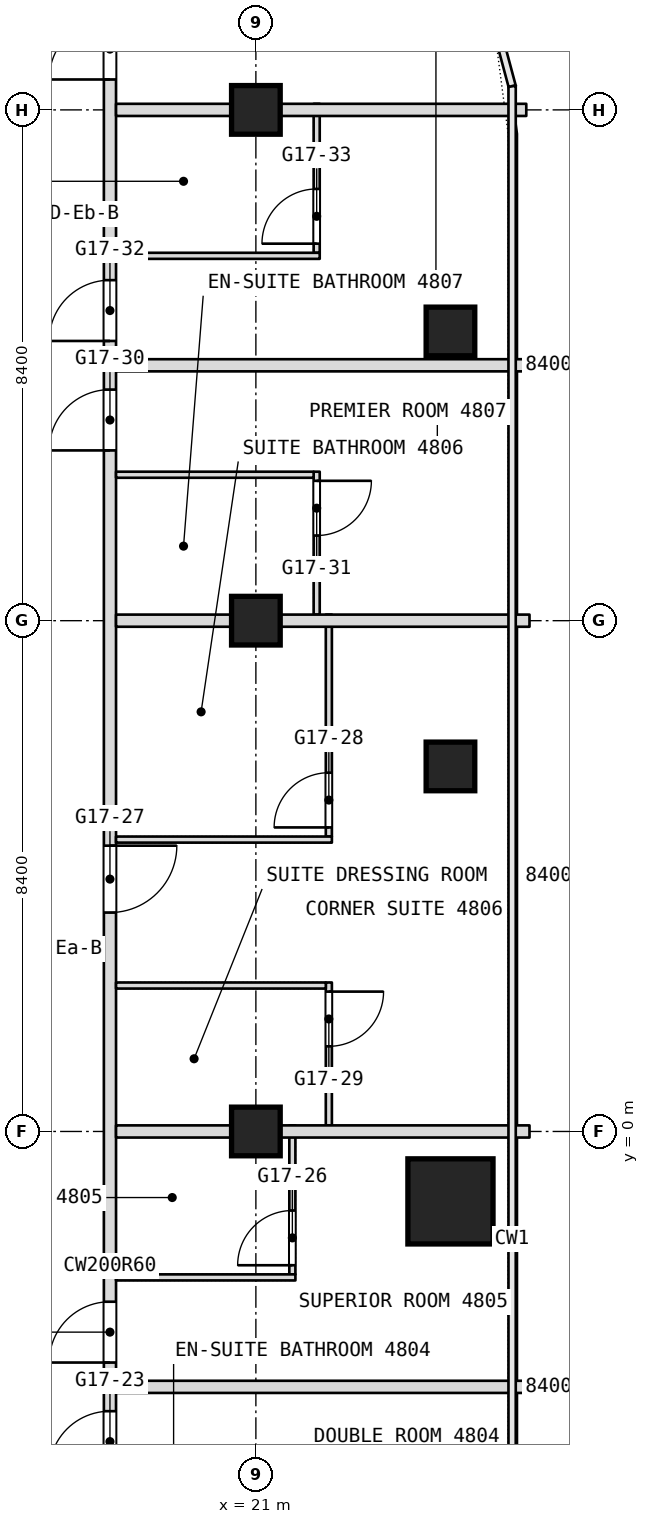
"""IFC4 building model, lengths in metres.
Left out: names, types, materials, properties, quantities, classifications, styles, units other than length and angle.
Written with IfcOpenShell. Run it as: python <this file> out.ifc"""

import sys

from ifc_helpers import new_model, si_unit, direction, frame, frame_2d, origin, origin_2d, place, context, subcontext, project, spatial, rectangle, extrude, element, fill, save


model = new_model("IFC4")
c1 = context("Model", 3, precision=1e-05, world=origin(), true_north=direction((0.0, 1.0)))
c2 = subcontext(c1, "Body", "Model", "MODEL_VIEW")
j1 = project(units=[si_unit("LENGTHUNIT", "METRE"), si_unit("PLANEANGLEUNIT", "RADIAN")], contexts=[c1])
p1 = place(None, origin())
s1 = spatial("IfcSite", under=j1, at=p1, CompositionType="ELEMENT")
p2 = place(p1, origin())
s2 = spatial("IfcBuilding", under=s1, at=p2, CompositionType="ELEMENT")
p3 = place(p2, frame((0.0, 0.0, 209.3)))
s3 = spatial("IfcBuildingStorey", under=s2, at=p3, CompositionType="ELEMENT", Elevation=209.3)
p4 = place(p3, frame((24.2, -1.15, 0.0), z_axis=(0.0, 0.0, 1.0), x_axis=(1.0, 0.0, 0.0)))
e1 = element("IfcColumn", 1, at=p4, inside=s3, PredefinedType="COLUMN", context=c2, shape_type="SweptSolid", body=[
    extrude(rectangle(XDim=1.4, YDim=1.4, at=origin_2d()), origin(), (0.0, 0.0, 1.0), 3.6),
])
for number, where, z_axis, x_axis in (
    (2, (21.0, 0.0, 0.0), (0.0, 0.0, 1.0), (1.0, 0.0, 0.0)),
    (3, (21.0, 8.4, 0.0), (0.0, 0.0, 1.0), (1.0, 0.0, 0.0)),
    (4, (21.0, 16.8, 0.0), (0.0, 0.0, 1.0), (1.0, 0.0, 0.0)),
    (5, (24.2, 13.156, 0.0), (0.0, 0.0, 1.0), (1.0, 0.0, 0.0)),
    (6, (24.2, 6.003, 0.0), (0.0, 0.0, 1.0), (1.0, 0.0, 0.0)),
):
    element("IfcColumn", number, at=place(p3, frame(where, z_axis=z_axis, x_axis=x_axis)), inside=s3, PredefinedType="COLUMN", context=c2, shape_type="SweptSolid", body=[
        extrude(rectangle(XDim=0.8, YDim=0.8, at=origin_2d()), origin(), (0.0, 0.0, 1.0), 3.6),
    ])
p5 = place(p3, frame((22.2, 0.1, 0.0), z_axis=(0.0, 0.0, 1.0), x_axis=(0.0, 1.0, 0.0)))
e7 = element("IfcWall", 7, at=p5, inside=s3, PredefinedType="PARTITIONING", context=c2, shape_type="SweptSolid", body=[
    extrude(rectangle(XDim=2.35, YDim=0.1, at=frame_2d((1.175, 0.0))), origin(), (0.0, 0.0, 1.0), 3.34),
])
p6 = place(p5, frame((1.3, 0.0, 0.0)))
e8 = element("IfcOpeningElement", 8, at=p6, cuts=e7, PredefinedType="OPENING", context=c2, shape_type="SweptSolid", body=[
    extrude(rectangle(XDim=0.9, YDim=2.1, at=frame_2d((0.45, 1.05))), frame((0.0, 0.05, 0.0), z_axis=(0.0, -1.0, 0.0), x_axis=(1.0, 0.0, 0.0)), (0.0, 0.0, 1.0), 0.1),
])
p7 = place(p3, frame((22.2, 4.85, 0.0), z_axis=(0.0, 0.0, 1.0), x_axis=(0.0, 1.0, 0.0)))
e9 = element("IfcWall", 9, at=p7, inside=s3, PredefinedType="PARTITIONING", context=c2, shape_type="SweptSolid", body=[
    extrude(rectangle(XDim=3.65, YDim=0.1, at=frame_2d((1.825, 0.0))), origin(), (0.0, 0.0, 1.0), 3.34),
])
p8 = place(p7, frame((0.15, 0.0, 0.0)))
e10 = element("IfcOpeningElement", 10, at=p8, cuts=e9, PredefinedType="OPENING", context=c2, shape_type="SweptSolid", body=[
    extrude(rectangle(XDim=0.9, YDim=2.1, at=frame_2d((0.45, 1.05))), frame((0.0, 0.05, 0.0), z_axis=(0.0, -1.0, 0.0), x_axis=(1.0, 0.0, 0.0)), (0.0, 0.0, 1.0), 0.1),
])
p9 = place(p3, frame((22.0, 8.5, 0.0), z_axis=(0.0, 0.0, 1.0), x_axis=(0.0, 1.0, 0.0)))
e11 = element("IfcWall", 11, at=p9, inside=s3, PredefinedType="PARTITIONING", context=c2, shape_type="SweptSolid", body=[
    extrude(rectangle(XDim=2.35, YDim=0.1, at=frame_2d((1.175, 0.0))), origin(), (0.0, 0.0, 1.0), 3.34),
])
p10 = place(p9, frame((1.3, 0.0, 0.0)))
e12 = element("IfcOpeningElement", 12, at=p10, cuts=e11, PredefinedType="OPENING", context=c2, shape_type="SweptSolid", body=[
    extrude(rectangle(XDim=0.9, YDim=2.1, at=frame_2d((0.45, 1.05))), frame((0.0, 0.05, 0.0), z_axis=(0.0, -1.0, 0.0), x_axis=(1.0, 0.0, 0.0)), (0.0, 0.0, 1.0), 0.1),
])
p11 = place(p3, frame((22.0, 14.45, 0.0), z_axis=(0.0, 0.0, 1.0), x_axis=(0.0, 1.0, 0.0)))
e13 = element("IfcWall", 13, at=p11, inside=s3, PredefinedType="PARTITIONING", context=c2, shape_type="SweptSolid", body=[
    extrude(rectangle(XDim=2.45, YDim=0.1, at=frame_2d((1.225, 0.0))), origin(), (0.0, 0.0, 1.0), 3.34),
])
p12 = place(p11, frame((0.15, 0.0, 0.0)))
e14 = element("IfcOpeningElement", 14, at=p12, cuts=e13, PredefinedType="OPENING", context=c2, shape_type="SweptSolid", body=[
    extrude(rectangle(XDim=0.9, YDim=2.1, at=frame_2d((0.45, 1.05))), frame((0.0, 0.05, 0.0), z_axis=(0.0, -1.0, 0.0), x_axis=(1.0, 0.0, 0.0)), (0.0, 0.0, 1.0), 0.1),
])
p13 = place(p3, frame((21.6, -2.35, 0.0), z_axis=(0.0, 0.0, 1.0), x_axis=(0.0, 1.0, 0.0)))
e15 = element("IfcWall", 15, at=p13, inside=s3, PredefinedType="PARTITIONING", context=c2, shape_type="SweptSolid", body=[
    extrude(rectangle(XDim=2.45, YDim=0.1, at=frame_2d((1.225, 0.0))), origin(), (0.0, 0.0, 1.0), 3.34),
])
p14 = place(p13, frame((0.15, 0.0, 0.0)))
e16 = element("IfcOpeningElement", 16, at=p14, cuts=e15, PredefinedType="OPENING", context=c2, shape_type="SweptSolid", body=[
    extrude(rectangle(XDim=0.9, YDim=2.1, at=frame_2d((0.45, 1.05))), frame((0.0, 0.05, 0.0), z_axis=(0.0, -1.0, 0.0), x_axis=(1.0, 0.0, 0.0)), (0.0, 0.0, 1.0), 0.1),
])
p15 = place(p3, frame((18.6, -26.751, 0.0), z_axis=(0.0, 0.0, 1.0), x_axis=(0.0, 1.0, 0.0)))
e17 = element("IfcWall", 17, at=p15, inside=s3, PredefinedType="PARTITIONING", context=c2, shape_type="SweptSolid", body=[
    extrude(rectangle(XDim=49.091, YDim=0.2, at=frame_2d((24.545, 0.0))), origin(), (0.0, 0.0, 1.0), 3.34),
])
p16 = place(p15, frame((3.413, 0.0, 0.0)))
e18 = element("IfcOpeningElement", 18, at=p16, cuts=e17, PredefinedType="OPENING", context=c2, shape_type="SweptSolid", body=[
    extrude(rectangle(XDim=1.0, YDim=2.1, at=frame_2d((0.5, 1.05))), frame((0.0, 0.1, 0.0), z_axis=(0.0, -1.0, 0.0), x_axis=(1.0, 0.0, 0.0)), (0.0, 0.0, 1.0), 0.2),
])
p17 = place(p15, frame((5.838, 0.0, 0.0)))
e19 = element("IfcOpeningElement", 19, at=p17, cuts=e17, PredefinedType="OPENING", context=c2, shape_type="SweptSolid", body=[
    extrude(rectangle(XDim=1.0, YDim=2.1, at=frame_2d((0.5, 1.05))), frame((0.0, 0.1, 0.0), z_axis=(0.0, -1.0, 0.0), x_axis=(1.0, 0.0, 0.0)), (0.0, 0.0, 1.0), 0.2),
])
p18 = place(p15, frame((13.551, 0.0, 0.0)))
e20 = element("IfcOpeningElement", 20, at=p18, cuts=e17, PredefinedType="OPENING", context=c2, shape_type="SweptSolid", body=[
    extrude(rectangle(XDim=1.1, YDim=2.1, at=frame_2d((0.55, 1.05))), frame((0.0, 0.1, 0.0), z_axis=(0.0, -1.0, 0.0), x_axis=(1.0, 0.0, 0.0)), (0.0, 0.0, 1.0), 0.2),
])
p19 = place(p15, frame((21.151, 0.0, 0.0)))
e21 = element("IfcOpeningElement", 21, at=p19, cuts=e17, PredefinedType="OPENING", context=c2, shape_type="SweptSolid", body=[
    extrude(rectangle(XDim=1.0, YDim=2.1, at=frame_2d((0.5, 1.05))), frame((0.0, 0.1, 0.0), z_axis=(0.0, -1.0, 0.0), x_axis=(1.0, 0.0, 0.0)), (0.0, 0.0, 1.0), 0.2),
])
p20 = place(p15, frame((22.951, 0.0, 0.0)))
e22 = element("IfcOpeningElement", 22, at=p20, cuts=e17, PredefinedType="OPENING", context=c2, shape_type="SweptSolid", body=[
    extrude(rectangle(XDim=1.0, YDim=2.1, at=frame_2d((0.5, 1.05))), frame((0.0, 0.1, 0.0), z_axis=(0.0, -1.0, 0.0), x_axis=(1.0, 0.0, 0.0)), (0.0, 0.0, 1.0), 0.2),
])
p21 = place(p15, frame((30.351, 0.0, 0.0)))
e23 = element("IfcOpeningElement", 23, at=p21, cuts=e17, PredefinedType="OPENING", context=c2, shape_type="SweptSolid", body=[
    extrude(rectangle(XDim=1.1, YDim=2.1, at=frame_2d((0.55, 1.05))), frame((0.0, 0.1, 0.0), z_axis=(0.0, -1.0, 0.0), x_axis=(1.0, 0.0, 0.0)), (0.0, 0.0, 1.0), 0.2),
])
p22 = place(p15, frame((37.951, 0.0, 0.0)))
e24 = element("IfcOpeningElement", 24, at=p22, cuts=e17, PredefinedType="OPENING", context=c2, shape_type="SweptSolid", body=[
    extrude(rectangle(XDim=1.0, YDim=2.1, at=frame_2d((0.5, 1.05))), frame((0.0, 0.1, 0.0), z_axis=(0.0, -1.0, 0.0), x_axis=(1.0, 0.0, 0.0)), (0.0, 0.0, 1.0), 0.2),
])
p23 = place(p15, frame((39.751, 0.0, 0.0)))
e25 = element("IfcOpeningElement", 25, at=p23, cuts=e17, PredefinedType="OPENING", context=c2, shape_type="SweptSolid", body=[
    extrude(rectangle(XDim=1.0, YDim=2.1, at=frame_2d((0.5, 1.05))), frame((0.0, 0.1, 0.0), z_axis=(0.0, -1.0, 0.0), x_axis=(1.0, 0.0, 0.0)), (0.0, 0.0, 1.0), 0.2),
])
p24 = place(p15, frame((44.051, 0.0, 0.0)))
e26 = element("IfcOpeningElement", 26, at=p24, cuts=e17, PredefinedType="OPENING", context=c2, shape_type="SweptSolid", body=[
    extrude(rectangle(XDim=1.0, YDim=2.1, at=frame_2d((0.5, 1.05))), frame((0.0, 0.1, 0.0), z_axis=(0.0, -1.0, 0.0), x_axis=(1.0, 0.0, 0.0)), (0.0, 0.0, 1.0), 0.2),
])
p25 = place(p3, frame((18.7, -4.2, 0.0), z_axis=(0.0, 0.0, 1.0), x_axis=(1.0, 0.0, 0.0)))
e27 = element("IfcWall", 27, at=p25, inside=s3, PredefinedType="PARTITIONING", context=c2, shape_type="SweptSolid", body=[
    extrude(rectangle(XDim=6.8, YDim=0.2, at=frame_2d((3.4, 0.0))), origin(), (0.0, 0.0, 1.0), 3.34),
])
p26 = place(p3, frame((18.7, -2.4, 0.0), z_axis=(0.0, 0.0, 1.0), x_axis=(1.0, 0.0, 0.0)))
e28 = element("IfcWall", 28, at=p26, inside=s3, PredefinedType="PARTITIONING", context=c2, shape_type="SweptSolid", body=[
    extrude(rectangle(XDim=2.95, YDim=0.1, at=frame_2d((1.475, 0.0))), origin(), (0.0, 0.0, 1.0), 3.34),
])
p27 = place(p3, frame((18.7, 0.0, 0.0), z_axis=(0.0, 0.0, 1.0), x_axis=(1.0, 0.0, 0.0)))
e29 = element("IfcWall", 29, at=p27, inside=s3, PredefinedType="PARTITIONING", context=c2, shape_type="SweptSolid", body=[
    extrude(rectangle(XDim=6.8, YDim=0.2, at=frame_2d((3.4, 0.0))), origin(), (0.0, 0.0, 1.0), 2.94),
])
p28 = place(p3, frame((18.7, 2.4, 0.0), z_axis=(0.0, 0.0, 1.0), x_axis=(1.0, 0.0, 0.0)))
e30 = element("IfcWall", 30, at=p28, inside=s3, PredefinedType="PARTITIONING", context=c2, shape_type="SweptSolid", body=[
    extrude(rectangle(XDim=3.45, YDim=0.1, at=frame_2d((1.725, 0.0))), origin(), (0.0, 0.0, 1.0), 3.34),
])
p29 = place(p3, frame((18.7, 4.8, 0.0), z_axis=(0.0, 0.0, 1.0), x_axis=(1.0, 0.0, 0.0)))
e31 = element("IfcWall", 31, at=p29, inside=s3, PredefinedType="PARTITIONING", context=c2, shape_type="SweptSolid", body=[
    extrude(rectangle(XDim=3.55, YDim=0.1, at=frame_2d((1.775, 0.0))), origin(), (0.0, 0.0, 1.0), 3.34),
])
p30 = place(p3, frame((18.7, 8.4, 0.0), z_axis=(0.0, 0.0, 1.0), x_axis=(1.0, 0.0, 0.0)))
e32 = element("IfcWall", 32, at=p30, inside=s3, PredefinedType="PARTITIONING", context=c2, shape_type="SweptSolid", body=[
    extrude(rectangle(XDim=6.8, YDim=0.2, at=frame_2d((3.4, 0.0))), origin(), (0.0, 0.0, 1.0), 2.94),
])
p31 = place(p3, frame((18.7, 10.8, 0.0), z_axis=(0.0, 0.0, 1.0), x_axis=(1.0, 0.0, 0.0)))
e33 = element("IfcWall", 33, at=p31, inside=s3, PredefinedType="PARTITIONING", context=c2, shape_type="SweptSolid", body=[
    extrude(rectangle(XDim=3.25, YDim=0.1, at=frame_2d((1.625, 0.0))), origin(), (0.0, 0.0, 1.0), 3.34),
])
p32 = place(p3, frame((18.7, 12.6, 0.0), z_axis=(0.0, 0.0, 1.0), x_axis=(1.0, 0.0, 0.0)))
e34 = element("IfcWall", 34, at=p32, inside=s3, PredefinedType="PARTITIONING", context=c2, shape_type="SweptSolid", body=[
    extrude(rectangle(XDim=6.8, YDim=0.2, at=frame_2d((3.4, 0.0))), origin(), (0.0, 0.0, 1.0), 3.34),
])
p33 = place(p3, frame((18.7, 14.4, 0.0), z_axis=(0.0, 0.0, 1.0), x_axis=(1.0, 0.0, 0.0)))
e35 = element("IfcWall", 35, at=p33, inside=s3, PredefinedType="PARTITIONING", context=c2, shape_type="SweptSolid", body=[
    extrude(rectangle(XDim=3.35, YDim=0.1, at=frame_2d((1.675, 0.0))), origin(), (0.0, 0.0, 1.0), 3.34),
])
p34 = place(p3, frame((18.7, 16.8, 0.0), z_axis=(0.0, 0.0, 1.0), x_axis=(1.0, 0.0, 0.0)))
e36 = element("IfcWall", 36, at=p34, inside=s3, PredefinedType="PARTITIONING", context=c2, shape_type="SweptSolid", body=[
    extrude(rectangle(XDim=6.747, YDim=0.2, at=frame_2d((3.374, 0.0))), origin(), (0.0, 0.0, 1.0), 2.94),
])
p35 = place(p6, origin())
e37 = element("IfcDoor", 37, at=p35, inside=s3, OperationType="SINGLE_SWING_RIGHT", PredefinedType="DOOR", context=c2, shape_type="SweptSolid", body=[
    extrude(rectangle(XDim=0.9, YDim=2.1, at=frame_2d((0.45, 1.05))), frame((0.0, 0.025, 0.0), z_axis=(0.0, -1.0, 0.0), x_axis=(1.0, 0.0, 0.0)), (0.0, 0.0, 1.0), 0.05),
])
fill(e8, e37)
p36 = place(p8, origin())
e38 = element("IfcDoor", 38, at=p36, inside=s3, OperationType="SINGLE_SWING_LEFT", PredefinedType="DOOR", context=c2, shape_type="SweptSolid", body=[
    extrude(rectangle(XDim=0.9, YDim=2.1, at=frame_2d((0.45, 1.05))), frame((0.0, 0.025, 0.0), z_axis=(0.0, -1.0, 0.0), x_axis=(1.0, 0.0, 0.0)), (0.0, 0.0, 1.0), 0.05),
])
fill(e10, e38)
p37 = place(p10, origin())
e39 = element("IfcDoor", 39, at=p37, inside=s3, OperationType="SINGLE_SWING_RIGHT", PredefinedType="DOOR", context=c2, shape_type="SweptSolid", body=[
    extrude(rectangle(XDim=0.9, YDim=2.1, at=frame_2d((0.45, 1.05))), frame((0.0, 0.025, 0.0), z_axis=(0.0, -1.0, 0.0), x_axis=(1.0, 0.0, 0.0)), (0.0, 0.0, 1.0), 0.05),
])
fill(e12, e39)
p38 = place(p12, origin())
e40 = element("IfcDoor", 40, at=p38, inside=s3, OperationType="SINGLE_SWING_LEFT", PredefinedType="DOOR", context=c2, shape_type="SweptSolid", body=[
    extrude(rectangle(XDim=0.9, YDim=2.1, at=frame_2d((0.45, 1.05))), frame((0.0, 0.025, 0.0), z_axis=(0.0, -1.0, 0.0), x_axis=(1.0, 0.0, 0.0)), (0.0, 0.0, 1.0), 0.05),
])
fill(e14, e40)
p39 = place(p14, origin())
e41 = element("IfcDoor", 41, at=p39, inside=s3, OperationType="SINGLE_SWING_LEFT", PredefinedType="DOOR", context=c2, shape_type="SweptSolid", body=[
    extrude(rectangle(XDim=0.9, YDim=2.1, at=frame_2d((0.45, 1.05))), frame((0.0, 0.025, 0.0), z_axis=(0.0, -1.0, 0.0), x_axis=(1.0, 0.0, 0.0)), (0.0, 0.0, 1.0), 0.05),
])
fill(e16, e41)
p40 = place(p19, origin())
e42 = element("IfcDoor", 42, at=p40, inside=s3, OperationType="SINGLE_SWING_LEFT", PredefinedType="DOOR", context=c2, shape_type="SweptSolid", body=[
    extrude(rectangle(XDim=1.0, YDim=2.1, at=frame_2d((0.5, 1.05))), frame((0.0, 0.025, 0.0), z_axis=(0.0, -1.0, 0.0), x_axis=(1.0, 0.0, 0.0)), (0.0, 0.0, 1.0), 0.05),
])
fill(e21, e42)
p41 = place(p20, origin())
e43 = element("IfcDoor", 43, at=p41, inside=s3, OperationType="SINGLE_SWING_LEFT", PredefinedType="DOOR", context=c2, shape_type="SweptSolid", body=[
    extrude(rectangle(XDim=1.0, YDim=2.1, at=frame_2d((0.5, 1.05))), frame((0.0, 0.025, 0.0), z_axis=(0.0, -1.0, 0.0), x_axis=(1.0, 0.0, 0.0)), (0.0, 0.0, 1.0), 0.05),
])
fill(e22, e43)
p42 = place(p21, origin())
e44 = element("IfcDoor", 44, at=p42, inside=s3, OperationType="SINGLE_SWING_LEFT", PredefinedType="DOOR", context=c2, shape_type="SweptSolid", body=[
    extrude(rectangle(XDim=1.1, YDim=2.1, at=frame_2d((0.55, 1.05))), frame((0.0, 0.025, 0.0), z_axis=(0.0, -1.0, 0.0), x_axis=(1.0, 0.0, 0.0)), (0.0, 0.0, 1.0), 0.05),
])
fill(e23, e44)
p43 = place(p22, origin())
e45 = element("IfcDoor", 45, at=p43, inside=s3, OperationType="SINGLE_SWING_RIGHT", PredefinedType="DOOR", context=c2, shape_type="SweptSolid", body=[
    extrude(rectangle(XDim=1.0, YDim=2.1, at=frame_2d((0.5, 1.05))), frame((0.0, 0.025, 0.0), z_axis=(0.0, -1.0, 0.0), x_axis=(1.0, 0.0, 0.0)), (0.0, 0.0, 1.0), 0.05),
])
fill(e24, e45)
p44 = place(p23, origin())
e46 = element("IfcDoor", 46, at=p44, inside=s3, OperationType="SINGLE_SWING_RIGHT", PredefinedType="DOOR", context=c2, shape_type="SweptSolid", body=[
    extrude(rectangle(XDim=1.0, YDim=2.1, at=frame_2d((0.5, 1.05))), frame((0.0, 0.025, 0.0), z_axis=(0.0, -1.0, 0.0), x_axis=(1.0, 0.0, 0.0)), (0.0, 0.0, 1.0), 0.05),
])
fill(e25, e46)
p45 = place(p24, origin())
e47 = element("IfcDoor", 47, at=p45, inside=s3, OperationType="SINGLE_SWING_RIGHT", PredefinedType="DOOR", context=c2, shape_type="SweptSolid", body=[
    extrude(rectangle(XDim=1.0, YDim=2.1, at=frame_2d((0.5, 1.05))), frame((0.0, 0.025, 0.0), z_axis=(0.0, -1.0, 0.0), x_axis=(1.0, 0.0, 0.0)), (0.0, 0.0, 1.0), 0.05),
])
fill(e26, e47)
save(model, sys.argv[1])
